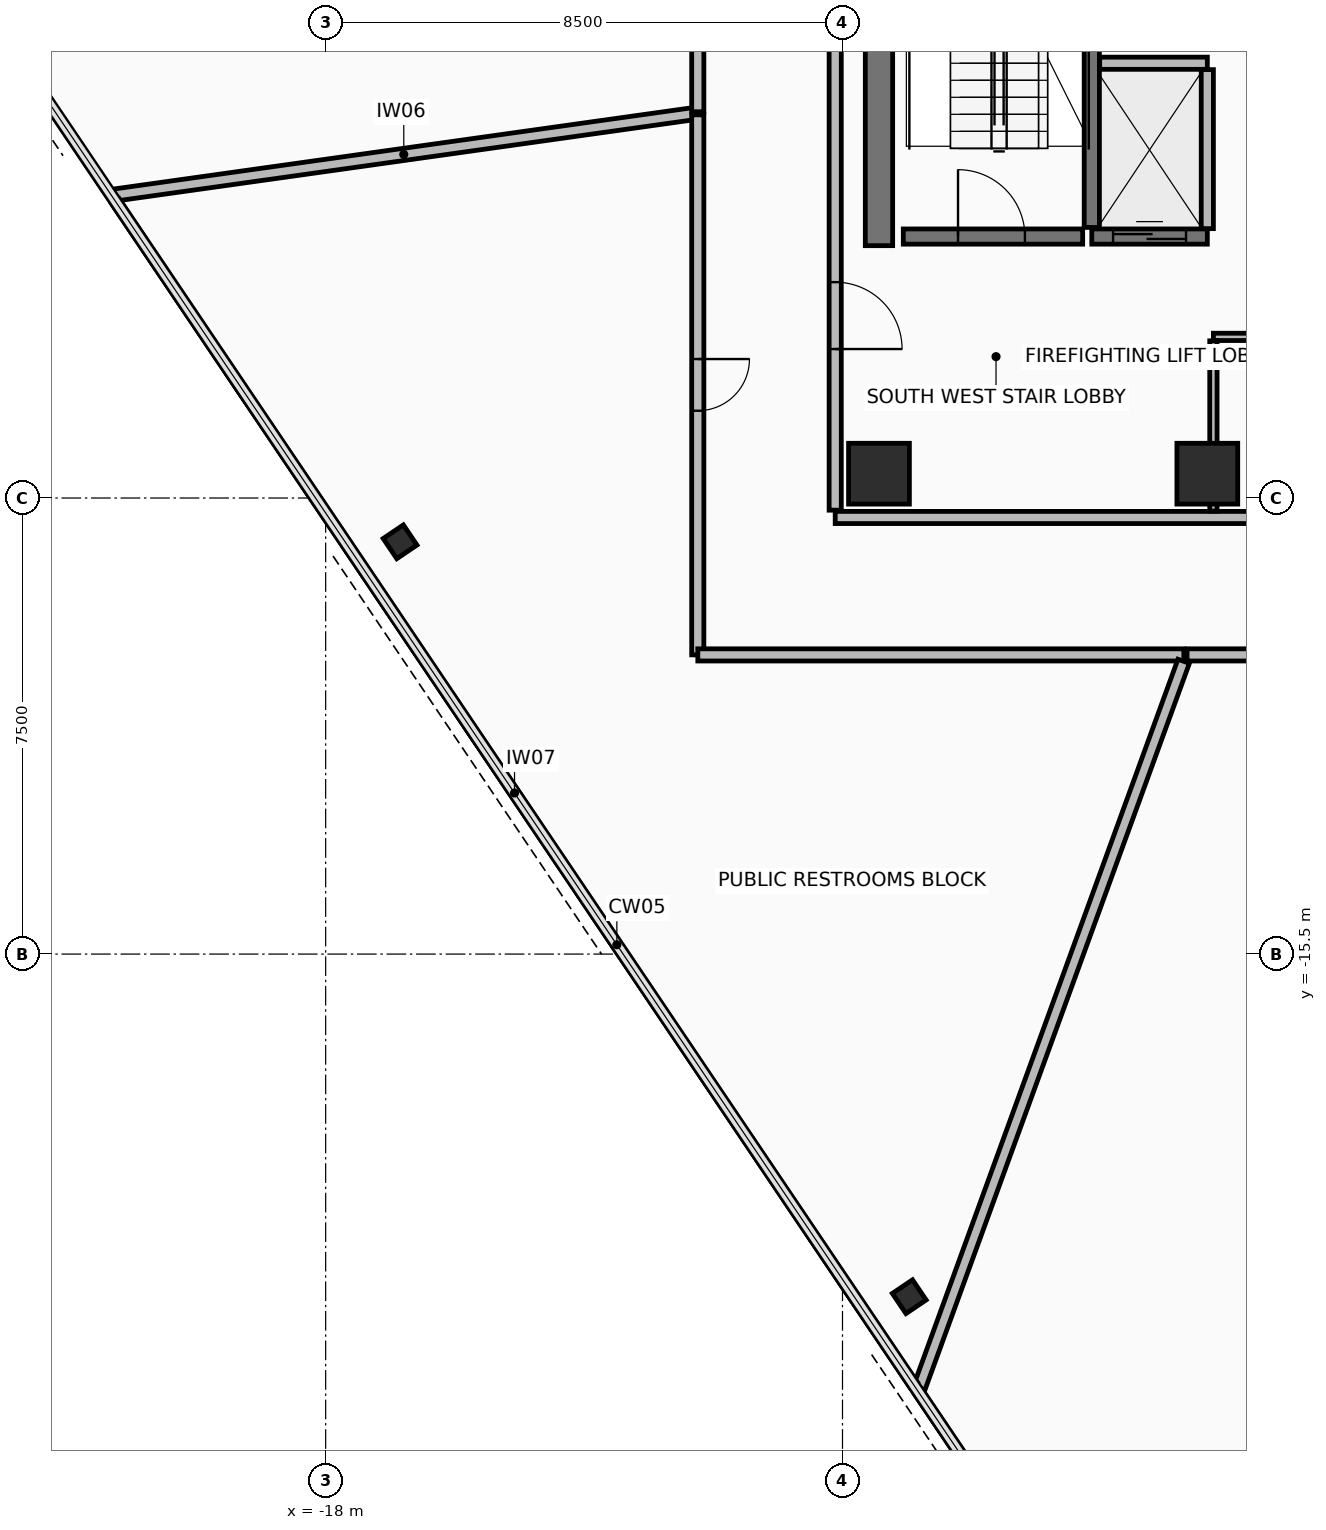
"""IFC4 building model, lengths in metres.
Left out: names, types, materials, properties, quantities, classifications, styles, units other than length and angle.
Written with IfcOpenShell. Run it as: python <this file> out.ifc"""

import sys

from ifc_helpers import new_model, si_unit, direction, frame, frame_2d, origin, origin_2d, place, context, subcontext, project, spatial, rectangle, hollow_rectangle, extrude, element, fill, save


model = new_model("IFC4")
c1 = context("Model", 3, precision=1e-05, world=origin(), true_north=direction((0.0, 1.0)))
c2 = subcontext(c1, "Body", "Model", "MODEL_VIEW")
j1 = project(units=[si_unit("LENGTHUNIT", "METRE"), si_unit("PLANEANGLEUNIT", "RADIAN")], contexts=[c1])
p1 = place(None, origin())
s1 = spatial("IfcSite", under=j1, at=p1, CompositionType="ELEMENT")
p2 = place(p1, origin())
s2 = spatial("IfcBuilding", under=s1, at=p2, CompositionType="ELEMENT")
p3 = place(p2, frame((0.0, 0.0, 257.0)))
s3 = spatial("IfcBuildingStorey", under=s2, at=p3, CompositionType="ELEMENT", Elevation=257.0)
for number, where, z_axis, x_axis in (
    (1, (-8.9, -7.6, 0.0), (0.0, 0.0, 1.0), (1.0, 0.0, 0.0)),
    (2, (-3.5, -7.6, 0.0), (0.0, 0.0, 1.0), (1.0, 0.0, 0.0)),
):
    element("IfcColumn", number, at=place(p3, frame(where, z_axis=z_axis, x_axis=x_axis)), inside=s3, PredefinedType="COLUMN", context=c2, shape_type="SweptSolid", body=[
        extrude(rectangle(XDim=1.0, YDim=1.0, at=origin_2d()), origin(), (0.0, 0.0, 1.0), 3.6),
    ])
for number, where, z_axis, x_axis in (
    (3, (-16.776, -8.72, 0.0), (0.0, 0.0, 1.0), (-0.559, 0.829, 0.0)),
    (4, (-8.402, -21.135, 0.0), (0.0, 0.0, 1.0), (-0.559, 0.829, 0.0)),
):
    element("IfcColumn", number, at=place(p3, frame(where, z_axis=z_axis, x_axis=x_axis)), inside=s3, PredefinedType="COLUMN", context=c2, shape_type="SweptSolid", body=[
        extrude(hollow_rectangle(XDim=0.4, YDim=0.4, WallThickness=0.025, at=origin_2d()), origin(), (0.0, 0.0, 1.0), 3.6),
    ])
p4 = place(p3, frame((-8.9, -3.85, 0.0), z_axis=(0.0, 0.0, 1.0), x_axis=(0.0, 1.0, 0.0)))
e5 = element("IfcWall", 5, at=p4, inside=s3, PredefinedType="SHEAR", context=c2, shape_type="SweptSolid", body=[
    extrude(rectangle(XDim=10.7, YDim=0.45, at=frame_2d((5.35, 0.0))), origin(), (0.0, 0.0, 1.0), 3.42),
])
p5 = place(p3, frame((-9.62, -8.32, 0.0), z_axis=(0.0, 0.0, 1.0), x_axis=(1.0, 0.0, 0.0)))
e6 = element("IfcWall", 6, at=p5, inside=s3, PredefinedType="PARTITIONING", context=c2, shape_type="SweptSolid", body=[
    extrude(rectangle(XDim=19.24, YDim=0.2, at=frame_2d((9.62, 0.0))), origin(), (0.0, 0.0, 1.0), 2.915),
])
p6 = place(p5, frame((7.37, 0.0, 0.0)))
e7 = element("IfcOpeningElement", 7, at=p6, cuts=e6, PredefinedType="OPENING", context=c2, shape_type="SweptSolid", body=[
    extrude(rectangle(XDim=0.9, YDim=2.1, at=frame_2d((0.45, 1.05))), frame((0.0, 0.11, 0.0), z_axis=(0.0, -1.0, 0.0), x_axis=(1.0, 0.0, 0.0)), (0.0, 0.0, 1.0), 0.22),
])
p7 = place(p5, frame((10.77, 0.0, 0.0)))
e8 = element("IfcOpeningElement", 8, at=p7, cuts=e6, PredefinedType="OPENING", context=c2, shape_type="SweptSolid", body=[
    extrude(rectangle(XDim=0.9, YDim=2.1, at=frame_2d((0.45, 1.05))), frame((0.0, 0.11, 0.0), z_axis=(0.0, -1.0, 0.0), x_axis=(1.0, 0.0, 0.0)), (0.0, 0.0, 1.0), 0.22),
])
p8 = place(p3, frame((-9.62, 8.2, 0.0), z_axis=(0.0, 0.0, 1.0), x_axis=(0.0, -1.0, 0.0)))
e9 = element("IfcWall", 9, at=p8, inside=s3, PredefinedType="PARTITIONING", context=c2, shape_type="SweptSolid", body=[
    extrude(rectangle(XDim=16.4, YDim=0.2, at=frame_2d((8.2, 0.0))), origin(), (0.0, 0.0, 1.0), 2.765),
])
p9 = place(p8, frame((12.65, 0.0, 0.0)))
e10 = element("IfcOpeningElement", 10, at=p9, cuts=e9, PredefinedType="OPENING", context=c2, shape_type="SweptSolid", body=[
    extrude(rectangle(XDim=1.1, YDim=2.15, at=frame_2d((0.55, 1.075))), frame((0.0, 0.11, 0.0), z_axis=(0.0, -1.0, 0.0), x_axis=(1.0, 0.0, 0.0)), (0.0, 0.0, 1.0), 0.22),
])
p10 = place(p3, frame((-5.4, -3.55, 0.0), z_axis=(0.0, 0.0, 1.0), x_axis=(0.0, 1.0, 0.0)))
e11 = element("IfcWall", 11, at=p10, inside=s3, PredefinedType="SHEAR", context=c2, shape_type="SweptSolid", body=[
    extrude(rectangle(XDim=7.3, YDim=0.25, at=frame_2d((3.65, 0.0))), origin(), (0.0, 0.0, 1.0), 3.42),
])
p11 = place(p3, frame((-8.5, -3.7, 0.0), z_axis=(0.0, 0.0, 1.0), x_axis=(1.0, 0.0, 0.0)))
e12 = element("IfcWall", 12, at=p11, inside=s3, PredefinedType="SHEAR", context=c2, shape_type="SweptSolid", body=[
    extrude(rectangle(XDim=2.95, YDim=0.25, at=frame_2d((1.475, 0.0))), origin(), (0.0, 0.0, 1.0), 3.42),
])
p12 = place(p11, frame((0.9, 0.0, 0.0)))
e13 = element("IfcOpeningElement", 13, at=p12, cuts=e12, PredefinedType="OPENING", context=c2, shape_type="SweptSolid", body=[
    extrude(rectangle(XDim=1.1, YDim=2.15, at=frame_2d((0.55, 1.075))), frame((0.0, 0.135, 0.0), z_axis=(0.0, -1.0, 0.0), x_axis=(1.0, 0.0, 0.0)), (0.0, 0.0, 1.0), 0.27),
])
p13 = place(p3, frame((-5.4, -3.7, 0.0), z_axis=(0.0, 0.0, 1.0), x_axis=(1.0, 0.0, 0.0)))
e14 = element("IfcWall", 14, at=p13, inside=s3, PredefinedType="SHEAR", context=c2, shape_type="SweptSolid", body=[
    extrude(rectangle(XDim=1.9, YDim=0.25, at=frame_2d((0.95, 0.0))), origin(), (0.0, 0.0, 1.0), 3.42),
])
p14 = place(p13, frame((0.35, 0.0, 0.0)))
e15 = element("IfcOpeningElement", 15, at=p14, cuts=e14, PredefinedType="OPENING", context=c2, shape_type="SweptSolid", body=[
    extrude(rectangle(XDim=1.2, YDim=2.2, at=frame_2d((0.6, 1.1))), frame((0.0, 0.135, 0.0), z_axis=(0.0, -1.0, 0.0), x_axis=(1.0, 0.0, 0.0)), (0.0, 0.0, 1.0), 0.27),
])
p15 = place(p3, frame((-5.27, -0.85, 0.0), z_axis=(0.0, 0.0, 1.0), x_axis=(1.0, 0.0, 0.0)))
e16 = element("IfcWall", 16, at=p15, inside=s3, PredefinedType="PARTITIONING", context=c2, shape_type="SweptSolid", body=[
    extrude(rectangle(XDim=1.77, YDim=0.2, at=frame_2d((0.885, 0.0))), origin(), (0.0, 0.0, 1.0), 3.42),
])
p16 = place(p3, frame((-3.5, -3.57, 0.0), z_axis=(0.0, 0.0, 1.0), x_axis=(0.0, 1.0, 0.0)))
e17 = element("IfcWall", 17, at=p16, inside=s3, PredefinedType="PARTITIONING", context=c2, shape_type="SweptSolid", body=[
    extrude(rectangle(XDim=2.615, YDim=0.2, at=frame_2d((1.308, 0.0))), origin(), (0.0, 0.0, 1.0), 3.42),
])
p17 = place(p3, frame((-0.265, -5.35, 0.0), z_axis=(0.0, 0.0, 1.0), x_axis=(-1.0, 0.0, 0.0)))
e18 = element("IfcWall", 18, at=p17, inside=s3, PredefinedType="PARTITIONING", context=c2, shape_type="SweptSolid", body=[
    extrude(rectangle(XDim=3.135, YDim=0.12, at=frame_2d((1.567, 0.0))), origin(), (0.0, 0.0, 1.0), 2.715),
])
p18 = place(p3, frame((-3.4, -5.415, 0.0), z_axis=(0.0, 0.0, 1.0), x_axis=(0.0, -1.0, 0.0)))
e19 = element("IfcWall", 19, at=p18, inside=s3, PredefinedType="PARTITIONING", context=c2, shape_type="SweptSolid", body=[
    extrude(rectangle(XDim=2.8, YDim=0.12, at=frame_2d((1.4, 0.0))), origin(), (0.0, 0.0, 1.0), 2.715),
])
p19 = place(p3, frame((-21.522, -3.025, 0.0), z_axis=(0.0, 0.0, 1.0), x_axis=(0.990265354778, 0.13919241045, 0.0)))
e20 = element("IfcWall", 20, at=p19, inside=s3, PredefinedType="PARTITIONING", context=c2, shape_type="SweptSolid", body=[
    extrude(rectangle(XDim=9.708, YDim=0.2, at=frame_2d((4.854, 0.0))), origin(), (0.0, 0.0, 1.0), 2.765),
])
p20 = place(p3, frame((-11.88, -1.698, 0.0), z_axis=(0.0, 0.0, 1.0), x_axis=(0.0, -1.0, 0.0)))
e21 = element("IfcWall", 21, at=p20, inside=s3, PredefinedType="PARTITIONING", context=c2, shape_type="SweptSolid", body=[
    extrude(rectangle(XDim=8.881, YDim=0.2, at=frame_2d((4.44, 0.0))), origin(), (0.0, 0.0, 1.0), 2.915),
])
p21 = place(p20, frame((4.016, 0.0, 0.0)))
e22 = element("IfcOpeningElement", 22, at=p21, cuts=e21, PredefinedType="OPENING", context=c2, shape_type="SweptSolid", body=[
    extrude(rectangle(XDim=0.85, YDim=2.1, at=frame_2d((0.425, 1.05))), frame((0.0, 0.11, 0.0), z_axis=(0.0, -1.0, 0.0), x_axis=(1.0, 0.0, 0.0)), (0.0, 0.0, 1.0), 0.22),
])
p22 = place(p3, frame((-11.879, -10.58, 0.0), z_axis=(0.0, 0.0, 1.0), x_axis=(1.0, 0.0, 0.0)))
e23 = element("IfcWall", 23, at=p22, inside=s3, PredefinedType="PARTITIONING", context=c2, shape_type="SweptSolid", body=[
    extrude(rectangle(XDim=7.993, YDim=0.2, at=frame_2d((3.997, 0.0))), origin(), (0.0, 0.0, 1.0), 2.915),
])
p23 = place(p3, frame((-3.889, -10.685, 0.0), z_axis=(0.0, 0.0, 1.0), x_axis=(-0.342029991506, -0.939689036283, 0.0)))
e24 = element("IfcWall", 24, at=p23, inside=s3, PredefinedType="PARTITIONING", context=c2, shape_type="SweptSolid", body=[
    extrude(rectangle(XDim=12.775, YDim=0.2, at=frame_2d((6.387, 0.0))), origin(), (0.0, 0.0, 1.0), 2.765),
])
p24 = place(p3, frame((-8.331, -22.582, 0.0), z_axis=(0.0, 0.0, 1.0), x_axis=(-0.559190048569, 0.829039498203, 0.0)))
e25 = element("IfcWall", 25, at=p24, inside=s3, PredefinedType="PARTITIONING", context=c2, shape_type="SweptSolid", body=[
    extrude(rectangle(XDim=23.473, YDim=0.15, at=frame_2d((11.737, 0.0))), origin(), (0.0, 0.0, 1.0), 3.42),
])
p25 = place(p3, frame((-0.024, -34.897, 0.0), z_axis=(0.0, 0.0, 1.0), x_axis=(-0.55919551537, 0.829035810801, 0.0)))
e26 = element("IfcWall", 26, at=p25, inside=s3, PredefinedType="PARTITIONING", context=c2, shape_type="SweptSolid", body=[
    extrude(rectangle(XDim=14.712, YDim=0.15, at=frame_2d((7.356, 0.0))), origin(), (0.0, 0.0, 1.0), 3.42),
])
p26 = place(p3, frame((-3.833, -10.58, 0.0), z_axis=(0.0, 0.0, 1.0), x_axis=(1.0, 0.0, 0.0)))
e27 = element("IfcWall", 27, at=p26, inside=s3, PredefinedType="PARTITIONING", context=c2, shape_type="SweptSolid", body=[
    extrude(rectangle(XDim=13.348, YDim=0.2, at=frame_2d((6.674, 0.0))), origin(), (0.0, 0.0, 1.0), 2.915),
])
p27 = place(p26, frame((6.249, 0.0, 0.0)))
e28 = element("IfcOpeningElement", 28, at=p27, cuts=e27, PredefinedType="OPENING", context=c2, shape_type="SweptSolid", body=[
    extrude(rectangle(XDim=0.85, YDim=2.1, at=frame_2d((0.425, 1.05))), frame((0.0, 0.11, 0.0), z_axis=(0.0, -1.0, 0.0), x_axis=(1.0, 0.0, 0.0)), (0.0, 0.0, 1.0), 0.22),
])
p28 = place(p3, frame((-11.88, 11.26, 0.0), z_axis=(0.0, 0.0, 1.0), x_axis=(0.0, -1.0, 0.0)))
e29 = element("IfcWall", 29, at=p28, inside=s3, PredefinedType="PARTITIONING", context=c2, shape_type="SweptSolid", body=[
    extrude(rectangle(XDim=12.908, YDim=0.2, at=frame_2d((6.454, 0.0))), origin(), (0.0, 0.0, 1.0), 2.765),
])
p29 = place(p28, frame((5.984, 0.0, 0.0)))
e30 = element("IfcOpeningElement", 30, at=p29, cuts=e29, PredefinedType="OPENING", context=c2, shape_type="SweptSolid", body=[
    extrude(rectangle(XDim=1.2, YDim=2.15, at=frame_2d((0.6, 1.075))), frame((0.0, 0.11, 0.0), z_axis=(0.0, -1.0, 0.0), x_axis=(1.0, 0.0, 0.0)), (0.0, 0.0, 1.0), 0.22),
])
p30 = place(p9, frame((1.1, 0.0, 0.0), z_axis=(0.0, 0.0, 1.0), x_axis=(-1.0, 0.0, 0.0)))
e31 = element("IfcDoor", 31, at=p30, inside=s3, OperationType="SINGLE_SWING_LEFT", PredefinedType="DOOR", context=c2, shape_type="SweptSolid", body=[
    extrude(rectangle(XDim=1.1, YDim=2.15, at=frame_2d((0.55, 1.075))), frame((0.0, 0.025, 0.0), z_axis=(0.0, -1.0, 0.0), x_axis=(1.0, 0.0, 0.0)), (0.0, 0.0, 1.0), 0.05),
])
fill(e10, e31)
p31 = place(p12, origin())
e32 = element("IfcDoor", 32, at=p31, inside=s3, OperationType="SINGLE_SWING_LEFT", PredefinedType="DOOR", context=c2, shape_type="SweptSolid", body=[
    extrude(rectangle(XDim=1.1, YDim=2.15, at=frame_2d((0.55, 1.075))), frame((0.0, 0.025, 0.0), z_axis=(0.0, -1.0, 0.0), x_axis=(1.0, 0.0, 0.0)), (0.0, 0.0, 1.0), 0.05),
])
fill(e13, e32)
p32 = place(p14, origin())
e33 = element("IfcDoor", 33, at=p32, inside=s3, OperationType="SLIDING_TO_RIGHT", PredefinedType="DOOR", context=c2, shape_type="SweptSolid", body=[
    extrude(rectangle(XDim=1.2, YDim=2.2, at=frame_2d((0.6, 1.1))), frame((0.0, 0.025, 0.0), z_axis=(0.0, -1.0, 0.0), x_axis=(1.0, 0.0, 0.0)), (0.0, 0.0, 1.0), 0.05),
])
fill(e15, e33)
p33 = place(p21, origin())
e34 = element("IfcDoor", 34, at=p33, inside=s3, OperationType="SINGLE_SWING_RIGHT", PredefinedType="DOOR", context=c2, shape_type="SweptSolid", body=[
    extrude(rectangle(XDim=0.85, YDim=2.1, at=frame_2d((0.425, 1.05))), frame((0.0, 0.025, 0.0), z_axis=(0.0, -1.0, 0.0), x_axis=(1.0, 0.0, 0.0)), (0.0, 0.0, 1.0), 0.05),
])
fill(e22, e34)
save(model, sys.argv[1])
